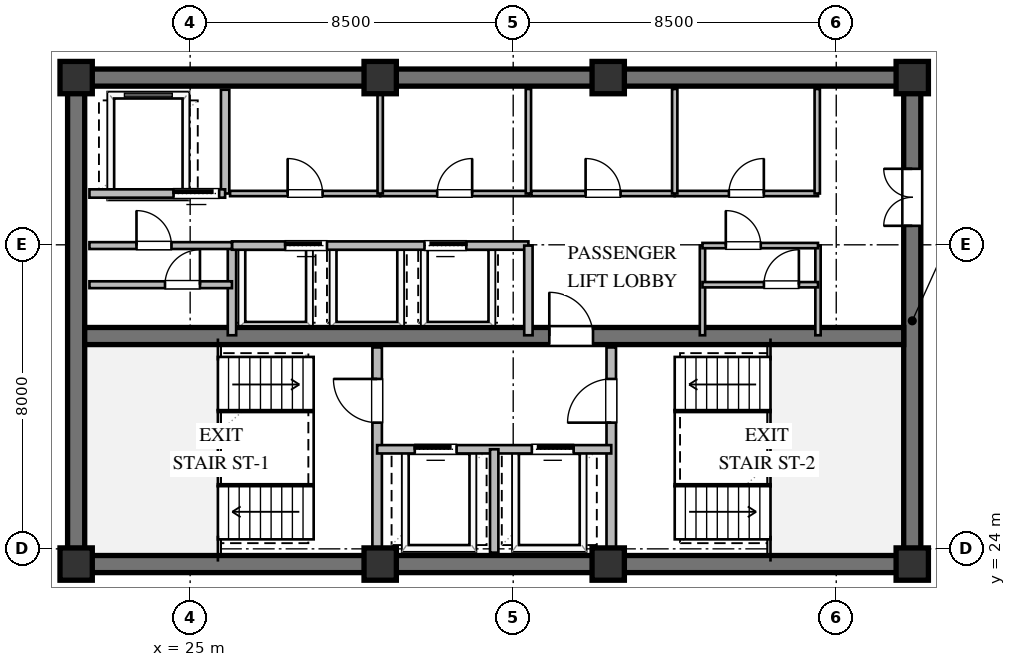
"""IFC4 building model, lengths in metres.
Left out: names, types, materials, properties, quantities, classifications, styles, units other than length and angle.
Written with IfcOpenShell. Run it as: python <this file> out.ifc"""

import sys

from ifc_helpers import new_model, si_unit, direction, frame, frame_2d, origin, origin_2d, place, context, subcontext, project, spatial, rectangle, extrude, element, fill, save


model = new_model("IFC4")
c1 = context("Model", 3, precision=1e-05, world=origin(), true_north=direction((0.0, 1.0)))
c2 = subcontext(c1, "Body", "Model", "MODEL_VIEW")
j1 = project(units=[si_unit("LENGTHUNIT", "METRE"), si_unit("PLANEANGLEUNIT", "RADIAN")], contexts=[c1])
p1 = place(None, origin())
s1 = spatial("IfcSite", under=j1, at=p1, CompositionType="ELEMENT")
p2 = place(p1, origin())
s2 = spatial("IfcBuilding", under=s1, at=p2, CompositionType="ELEMENT")
p3 = place(p2, frame((0.0, 0.0, 199.2)))
s3 = spatial("IfcBuildingStorey", under=s2, at=p3, CompositionType="ELEMENT", Elevation=199.2)
for number, where, z_axis, x_axis in (
    (1, (21.775, 23.6, 0.0), (0.0, 0.0, 1.0), (1.0, 0.0, 0.0)),
    (2, (21.775, 36.4, 0.0), (0.0, 0.0, 1.0), (1.0, 0.0, 0.0)),
):
    element("IfcWall", number, at=place(p3, frame(where, z_axis=z_axis, x_axis=x_axis)), inside=s3, PredefinedType="SHEAR", context=c2, shape_type="SweptSolid", body=[
        extrude(rectangle(XDim=22.45, YDim=0.45, at=frame_2d((11.225, 0.0))), origin(), (0.0, 0.0, 1.0), 3.36),
    ])
p4 = place(p3, frame((22.0, 23.825, 0.0), z_axis=(0.0, 0.0, 1.0), x_axis=(0.0, 1.0, 0.0)))
e3 = element("IfcWall", 3, at=p4, inside=s3, PredefinedType="SHEAR", context=c2, shape_type="SweptSolid", body=[
    extrude(rectangle(XDim=12.35, YDim=0.45, at=frame_2d((6.175, 0.0))), origin(), (0.0, 0.0, 1.0), 3.36),
])
p5 = place(p3, frame((44.0, 23.825, 0.0), z_axis=(0.0, 0.0, 1.0), x_axis=(0.0, 1.0, 0.0)))
e4 = element("IfcWall", 4, at=p5, inside=s3, PredefinedType="SHEAR", context=c2, shape_type="SweptSolid", body=[
    extrude(rectangle(XDim=12.35, YDim=0.45, at=frame_2d((6.175, 0.0))), origin(), (0.0, 0.0, 1.0), 3.36),
])
p6 = place(p5, frame((8.675, 0.0, 0.0)))
e5 = element("IfcOpeningElement", 5, at=p6, cuts=e4, PredefinedType="OPENING", context=c2, shape_type="SweptSolid", body=[
    extrude(rectangle(XDim=1.5, YDim=2.15, at=frame_2d((0.75, 1.075))), frame((0.0, 0.235, 0.0), z_axis=(0.0, -1.0, 0.0), x_axis=(1.0, 0.0, 0.0)), (0.0, 0.0, 1.0), 0.47),
])
p7 = place(p3, frame((22.225, 29.6, 0.0), z_axis=(0.0, 0.0, 1.0), x_axis=(1.0, 0.0, 0.0)))
e6 = element("IfcWall", 6, at=p7, inside=s3, PredefinedType="SHEAR", context=c2, shape_type="SweptSolid", body=[
    extrude(rectangle(XDim=21.55, YDim=0.45, at=frame_2d((10.775, 0.0))), origin(), (0.0, 0.0, 1.0), 3.36),
])
p8 = place(p7, frame((12.225, 0.0, 0.0)))
e7 = element("IfcOpeningElement", 7, at=p8, cuts=e6, PredefinedType="OPENING", context=c2, shape_type="SweptSolid", body=[
    extrude(rectangle(XDim=1.15, YDim=2.1, at=frame_2d((0.575, 1.05))), frame((0.0, 0.235, 0.0), z_axis=(0.0, -1.0, 0.0), x_axis=(1.0, 0.0, 0.0)), (0.0, 0.0, 1.0), 0.47),
])
for number, where, z_axis, x_axis in (
    (8, (22.0, 23.6, 0.0), (0.0, 0.0, 1.0), (1.0, 0.0, 0.0)),
    (9, (30.0, 23.6, 0.0), (0.0, 0.0, 1.0), (1.0, 0.0, 0.0)),
    (10, (36.0, 23.6, 0.0), (0.0, 0.0, 1.0), (1.0, 0.0, 0.0)),
    (11, (44.0, 23.6, 0.0), (0.0, 0.0, 1.0), (1.0, 0.0, 0.0)),
    (12, (44.0, 36.4, 0.0), (0.0, 0.0, 1.0), (1.0, 0.0, 0.0)),
    (13, (36.0, 36.4, 0.0), (0.0, 0.0, 1.0), (1.0, 0.0, 0.0)),
    (14, (30.0, 36.4, 0.0), (0.0, 0.0, 1.0), (1.0, 0.0, 0.0)),
    (15, (22.0, 36.4, 0.0), (0.0, 0.0, 1.0), (1.0, 0.0, 0.0)),
):
    element("IfcColumn", number, at=place(p3, frame(where, z_axis=z_axis, x_axis=x_axis)), inside=s3, PredefinedType="COLUMN", context=c2, shape_type="SweptSolid", body=[
        extrude(rectangle(XDim=0.85, YDim=0.85, at=origin_2d()), origin(), (0.0, 0.0, 1.0), 3.6),
    ])
p9 = place(p3, frame((29.92, 23.9, 0.0), z_axis=(0.0, 0.0, 1.0), x_axis=(0.0, 1.0, 0.0)))
e16 = element("IfcWall", 16, at=p9, inside=s3, PredefinedType="SOLIDWALL", context=c2, shape_type="SweptSolid", body=[
    extrude(rectangle(XDim=5.4, YDim=0.25, at=frame_2d((2.7, 0.0))), origin(), (0.0, 0.0, 1.0), 3.36),
])
p10 = place(p9, frame((3.421, 0.0, 0.0)))
e17 = element("IfcOpeningElement", 17, at=p10, cuts=e16, PredefinedType="OPENING", context=c2, shape_type="SweptSolid", body=[
    extrude(rectangle(XDim=1.15, YDim=2.1, at=frame_2d((0.575, 1.05))), frame((0.0, 0.135, 0.0), z_axis=(0.0, -1.0, 0.0), x_axis=(1.0, 0.0, 0.0)), (0.0, 0.0, 1.0), 0.27),
])
p11 = place(p3, frame((36.08, 23.9, 0.0), z_axis=(0.0, 0.0, 1.0), x_axis=(0.0, 1.0, 0.0)))
e18 = element("IfcWall", 18, at=p11, inside=s3, PredefinedType="SOLIDWALL", context=c2, shape_type="SweptSolid", body=[
    extrude(rectangle(XDim=5.4, YDim=0.25, at=frame_2d((2.7, 0.0))), origin(), (0.0, 0.0, 1.0), 3.36),
])
p12 = place(p11, frame((3.421, 0.0, 0.0)))
e19 = element("IfcOpeningElement", 19, at=p12, cuts=e18, PredefinedType="OPENING", context=c2, shape_type="SweptSolid", body=[
    extrude(rectangle(XDim=1.15, YDim=2.1, at=frame_2d((0.575, 1.05))), frame((0.0, 0.135, 0.0), z_axis=(0.0, -1.0, 0.0), x_axis=(1.0, 0.0, 0.0)), (0.0, 0.0, 1.0), 0.27),
])
p13 = place(p3, frame((29.92, 26.62, 0.0), z_axis=(0.0, 0.0, 1.0), x_axis=(1.0, 0.0, 0.0)))
e20 = element("IfcWall", 20, at=p13, inside=s3, PredefinedType="SOLIDWALL", context=c2, shape_type="SweptSolid", body=[
    extrude(rectangle(XDim=6.16, YDim=0.22, at=frame_2d((3.08, 0.0))), origin(), (0.0, 0.0, 1.0), 3.36),
])
p14 = place(p13, frame((0.99, 0.0, 0.0)))
e21 = element("IfcOpeningElement", 21, at=p14, cuts=e20, PredefinedType="OPENING", context=c2, shape_type="SweptSolid", body=[
    extrude(rectangle(XDim=1.1, YDim=2.1, at=frame_2d((0.55, 1.05))), frame((0.0, 0.12, 0.0), z_axis=(0.0, -1.0, 0.0), x_axis=(1.0, 0.0, 0.0)), (0.0, 0.0, 1.0), 0.24),
])
p15 = place(p13, frame((4.07, 0.0, 0.0)))
e22 = element("IfcOpeningElement", 22, at=p15, cuts=e20, PredefinedType="OPENING", context=c2, shape_type="SweptSolid", body=[
    extrude(rectangle(XDim=1.1, YDim=2.1, at=frame_2d((0.55, 1.05))), frame((0.0, 0.12, 0.0), z_axis=(0.0, -1.0, 0.0), x_axis=(1.0, 0.0, 0.0)), (0.0, 0.0, 1.0), 0.24),
])
p16 = place(p3, frame((33.0, 23.9, 0.0), z_axis=(0.0, 0.0, 1.0), x_axis=(0.0, 1.0, 0.0)))
e23 = element("IfcWall", 23, at=p16, inside=s3, PredefinedType="SOLIDWALL", context=c2, shape_type="SweptSolid", body=[
    extrude(rectangle(XDim=2.72, YDim=0.22, at=frame_2d((1.36, 0.0))), origin(), (0.0, 0.0, 1.0), 3.36),
])
p17 = place(p3, frame((25.92, 33.35, 0.0), z_axis=(0.0, 0.0, 1.0), x_axis=(0.0, 1.0, 0.0)))
e24 = element("IfcWall", 24, at=p17, inside=s3, PredefinedType="SOLIDWALL", context=c2, shape_type="SweptSolid", body=[
    extrude(rectangle(XDim=2.73, YDim=0.22, at=frame_2d((1.365, 0.0))), origin(), (0.0, 0.0, 1.0), 3.36),
])
p18 = place(p3, frame((22.35, 33.35, 0.0), z_axis=(0.0, 0.0, 1.0), x_axis=(1.0, 0.0, 0.0)))
e25 = element("IfcWall", 25, at=p18, inside=s3, PredefinedType="SOLIDWALL", context=c2, shape_type="SweptSolid", body=[
    extrude(rectangle(XDim=3.57, YDim=0.22, at=frame_2d((1.785, 0.0))), origin(), (0.0, 0.0, 1.0), 3.36),
])
p19 = place(p18, frame((2.213, 0.0, 0.0)))
e26 = element("IfcOpeningElement", 26, at=p19, cuts=e25, PredefinedType="OPENING", context=c2, shape_type="SweptSolid", body=[
    extrude(rectangle(XDim=1.2, YDim=2.1, at=frame_2d((0.6, 1.05))), frame((0.0, 0.12, 0.0), z_axis=(0.0, -1.0, 0.0), x_axis=(1.0, 0.0, 0.0)), (0.0, 0.0, 1.0), 0.24),
])
p20 = place(p3, frame((26.1, 29.62, 0.0), z_axis=(0.0, 0.0, 1.0), x_axis=(0.0, 1.0, 0.0)))
e27 = element("IfcWall", 27, at=p20, inside=s3, PredefinedType="SOLIDWALL", context=c2, shape_type="SweptSolid", body=[
    extrude(rectangle(XDim=2.36, YDim=0.22, at=frame_2d((1.18, 0.0))), origin(), (0.0, 0.0, 1.0), 3.36),
])
p21 = place(p3, frame((26.1, 31.98, 0.0), z_axis=(0.0, 0.0, 1.0), x_axis=(1.0, 0.0, 0.0)))
e28 = element("IfcWall", 28, at=p21, inside=s3, PredefinedType="SOLIDWALL", context=c2, shape_type="SweptSolid", body=[
    extrude(rectangle(XDim=7.8, YDim=0.22, at=frame_2d((3.9, 0.0))), origin(), (0.0, 0.0, 1.0), 3.36),
])
p22 = place(p21, frame((1.4, 0.0, 0.0)))
e29 = element("IfcOpeningElement", 29, at=p22, cuts=e28, PredefinedType="OPENING", context=c2, shape_type="SweptSolid", body=[
    extrude(rectangle(XDim=1.1, YDim=2.1, at=frame_2d((0.55, 1.05))), frame((0.0, 0.12, 0.0), z_axis=(0.0, -1.0, 0.0), x_axis=(1.0, 0.0, 0.0)), (0.0, 0.0, 1.0), 0.24),
])
p23 = place(p21, frame((5.066, 0.0, 0.0)))
e30 = element("IfcOpeningElement", 30, at=p23, cuts=e28, PredefinedType="OPENING", context=c2, shape_type="SweptSolid", body=[
    extrude(rectangle(XDim=1.1, YDim=2.1, at=frame_2d((0.55, 1.05))), frame((0.0, 0.12, 0.0), z_axis=(0.0, -1.0, 0.0), x_axis=(1.0, 0.0, 0.0)), (0.0, 0.0, 1.0), 0.24),
])
p24 = place(p3, frame((33.9, 29.62, 0.0), z_axis=(0.0, 0.0, 1.0), x_axis=(0.0, 1.0, 0.0)))
e31 = element("IfcWall", 31, at=p24, inside=s3, PredefinedType="SOLIDWALL", context=c2, shape_type="SweptSolid", body=[
    extrude(rectangle(XDim=2.36, YDim=0.22, at=frame_2d((1.18, 0.0))), origin(), (0.0, 0.0, 1.0), 3.36),
])
p25 = place(p3, frame((26.05, 33.35, 0.0), z_axis=(0.0, 0.0, 1.0), x_axis=(1.0, 0.0, 0.0)))
e32 = element("IfcWall", 32, at=p25, inside=s3, PredefinedType="PARTITIONING", context=c2, shape_type="SweptSolid", body=[
    extrude(rectangle(XDim=3.95, YDim=0.14, at=frame_2d((1.975, 0.0))), origin(), (0.0, 0.0, 1.0), 3.36),
])
p26 = place(p25, frame((1.515, 0.0, 0.0)))
e33 = element("IfcOpeningElement", 33, at=p26, cuts=e32, PredefinedType="OPENING", context=c2, shape_type="SweptSolid", body=[
    extrude(rectangle(XDim=0.92, YDim=2.1, at=frame_2d((0.46, 1.05))), frame((0.0, 0.08, 0.0), z_axis=(0.0, -1.0, 0.0), x_axis=(1.0, 0.0, 0.0)), (0.0, 0.0, 1.0), 0.16),
])
p27 = place(p3, frame((30.0, 33.35, 0.0), z_axis=(0.0, 0.0, 1.0), x_axis=(1.0, 0.0, 0.0)))
e34 = element("IfcWall", 34, at=p27, inside=s3, PredefinedType="PARTITIONING", context=c2, shape_type="SweptSolid", body=[
    extrude(rectangle(XDim=3.92, YDim=0.14, at=frame_2d((1.96, 0.0))), origin(), (0.0, 0.0, 1.0), 3.36),
])
p28 = place(p27, frame((1.5, 0.0, 0.0)))
e35 = element("IfcOpeningElement", 35, at=p28, cuts=e34, PredefinedType="OPENING", context=c2, shape_type="SweptSolid", body=[
    extrude(rectangle(XDim=0.92, YDim=2.1, at=frame_2d((0.46, 1.05))), frame((0.0, 0.08, 0.0), z_axis=(0.0, -1.0, 0.0), x_axis=(1.0, 0.0, 0.0)), (0.0, 0.0, 1.0), 0.16),
])
for number, where, z_axis, x_axis in (
    (36, (30.0, 33.35, 0.0), (0.0, 0.0, 1.0), (0.0, 1.0, 0.0)),
    (37, (33.9, 33.35, 0.0), (0.0, 0.0, 1.0), (0.0, 1.0, 0.0)),
):
    element("IfcWall", number, at=place(p3, frame(where, z_axis=z_axis, x_axis=x_axis)), inside=s3, PredefinedType="PARTITIONING", context=c2, shape_type="SweptSolid", body=[
        extrude(rectangle(XDim=2.75, YDim=0.14, at=frame_2d((1.375, 0.0))), origin(), (0.0, 0.0, 1.0), 3.36),
    ])
p29 = place(p3, frame((33.98, 33.35, 0.0), z_axis=(0.0, 0.0, 1.0), x_axis=(1.0, 0.0, 0.0)))
e38 = element("IfcWall", 38, at=p29, inside=s3, PredefinedType="PARTITIONING", context=c2, shape_type="SweptSolid", body=[
    extrude(rectangle(XDim=3.77, YDim=0.14, at=frame_2d((1.885, 0.0))), origin(), (0.0, 0.0, 1.0), 3.36),
])
p30 = place(p29, frame((1.425, 0.0, 0.0)))
e39 = element("IfcOpeningElement", 39, at=p30, cuts=e38, PredefinedType="OPENING", context=c2, shape_type="SweptSolid", body=[
    extrude(rectangle(XDim=0.92, YDim=2.1, at=frame_2d((0.46, 1.05))), frame((0.0, 0.08, 0.0), z_axis=(0.0, -1.0, 0.0), x_axis=(1.0, 0.0, 0.0)), (0.0, 0.0, 1.0), 0.16),
])
p31 = place(p3, frame((37.75, 33.35, 0.0), z_axis=(0.0, 0.0, 1.0), x_axis=(1.0, 0.0, 0.0)))
e40 = element("IfcWall", 40, at=p31, inside=s3, PredefinedType="PARTITIONING", context=c2, shape_type="SweptSolid", body=[
    extrude(rectangle(XDim=3.77, YDim=0.14, at=frame_2d((1.885, 0.0))), origin(), (0.0, 0.0, 1.0), 3.36),
])
p32 = place(p31, frame((1.425, 0.0, 0.0)))
e41 = element("IfcOpeningElement", 41, at=p32, cuts=e40, PredefinedType="OPENING", context=c2, shape_type="SweptSolid", body=[
    extrude(rectangle(XDim=0.92, YDim=2.1, at=frame_2d((0.46, 1.05))), frame((0.0, 0.08, 0.0), z_axis=(0.0, -1.0, 0.0), x_axis=(1.0, 0.0, 0.0)), (0.0, 0.0, 1.0), 0.16),
])
for number, where, z_axis, x_axis in (
    (42, (37.75, 33.35, 0.0), (0.0, 0.0, 1.0), (0.0, 1.0, 0.0)),
    (43, (41.5, 33.35, 0.0), (0.0, 0.0, 1.0), (0.0, 1.0, 0.0)),
):
    element("IfcWall", number, at=place(p3, frame(where, z_axis=z_axis, x_axis=x_axis)), inside=s3, PredefinedType="PARTITIONING", context=c2, shape_type="SweptSolid", body=[
        extrude(rectangle(XDim=2.75, YDim=0.14, at=frame_2d((1.375, 0.0))), origin(), (0.0, 0.0, 1.0), 3.36),
    ])
p33 = place(p3, frame((22.35, 30.95, 0.0), z_axis=(0.0, 0.0, 1.0), x_axis=(1.0, 0.0, 0.0)))
e44 = element("IfcWall", 44, at=p33, inside=s3, PredefinedType="PARTITIONING", context=c2, shape_type="SweptSolid", body=[
    extrude(rectangle(XDim=3.75, YDim=0.18, at=frame_2d((1.875, 0.0))), origin(), (0.0, 0.0, 1.0), 3.36),
])
p34 = place(p33, frame((1.988, 0.0, 0.0)))
e45 = element("IfcOpeningElement", 45, at=p34, cuts=e44, PredefinedType="OPENING", context=c2, shape_type="SweptSolid", body=[
    extrude(rectangle(XDim=0.92, YDim=2.1, at=frame_2d((0.46, 1.05))), frame((0.0, 0.1, 0.0), z_axis=(0.0, -1.0, 0.0), x_axis=(1.0, 0.0, 0.0)), (0.0, 0.0, 1.0), 0.2),
])
p35 = place(p3, frame((22.35, 31.98, 0.0), z_axis=(0.0, 0.0, 1.0), x_axis=(1.0, 0.0, 0.0)))
e46 = element("IfcWall", 46, at=p35, inside=s3, PredefinedType="PARTITIONING", context=c2, shape_type="SweptSolid", body=[
    extrude(rectangle(XDim=3.75, YDim=0.18, at=frame_2d((1.875, 0.0))), origin(), (0.0, 0.0, 1.0), 3.36),
])
p36 = place(p35, frame((1.238, 0.0, 0.0)))
e47 = element("IfcOpeningElement", 47, at=p36, cuts=e46, PredefinedType="OPENING", context=c2, shape_type="SweptSolid", body=[
    extrude(rectangle(XDim=0.92, YDim=2.1, at=frame_2d((0.46, 1.05))), frame((0.0, 0.1, 0.0), z_axis=(0.0, -1.0, 0.0), x_axis=(1.0, 0.0, 0.0)), (0.0, 0.0, 1.0), 0.2),
])
for number, where, z_axis, x_axis in (
    (48, (38.48, 29.62, 0.0), (0.0, 0.0, 1.0), (0.0, 1.0, 0.0)),
    (49, (41.52, 29.62, 0.0), (0.0, 0.0, 1.0), (0.0, 1.0, 0.0)),
):
    element("IfcWall", number, at=place(p3, frame(where, z_axis=z_axis, x_axis=x_axis)), inside=s3, PredefinedType="PARTITIONING", context=c2, shape_type="SweptSolid", body=[
        extrude(rectangle(XDim=2.36, YDim=0.14, at=frame_2d((1.18, 0.0))), origin(), (0.0, 0.0, 1.0), 3.36),
    ])
p37 = place(p3, frame((38.48, 30.95, 0.0), z_axis=(0.0, 0.0, 1.0), x_axis=(1.0, 0.0, 0.0)))
e50 = element("IfcWall", 50, at=p37, inside=s3, PredefinedType="PARTITIONING", context=c2, shape_type="SweptSolid", body=[
    extrude(rectangle(XDim=3.04, YDim=0.14, at=frame_2d((1.52, 0.0))), origin(), (0.0, 0.0, 1.0), 3.36),
])
p38 = place(p37, frame((1.617, 0.0, 0.0)))
e51 = element("IfcOpeningElement", 51, at=p38, cuts=e50, PredefinedType="OPENING", context=c2, shape_type="SweptSolid", body=[
    extrude(rectangle(XDim=0.92, YDim=2.1, at=frame_2d((0.46, 1.05))), frame((0.0, 0.08, 0.0), z_axis=(0.0, -1.0, 0.0), x_axis=(1.0, 0.0, 0.0)), (0.0, 0.0, 1.0), 0.16),
])
p39 = place(p3, frame((38.48, 31.98, 0.0), z_axis=(0.0, 0.0, 1.0), x_axis=(1.0, 0.0, 0.0)))
e52 = element("IfcWall", 52, at=p39, inside=s3, PredefinedType="PARTITIONING", context=c2, shape_type="SweptSolid", body=[
    extrude(rectangle(XDim=3.04, YDim=0.14, at=frame_2d((1.52, 0.0))), origin(), (0.0, 0.0, 1.0), 3.36),
])
p40 = place(p39, frame((0.614, 0.0, 0.0)))
e53 = element("IfcOpeningElement", 53, at=p40, cuts=e52, PredefinedType="OPENING", context=c2, shape_type="SweptSolid", body=[
    extrude(rectangle(XDim=0.92, YDim=2.1, at=frame_2d((0.46, 1.05))), frame((0.0, 0.08, 0.0), z_axis=(0.0, -1.0, 0.0), x_axis=(1.0, 0.0, 0.0)), (0.0, 0.0, 1.0), 0.16),
])
p41 = place(p10, origin())
e54 = element("IfcDoor", 54, at=p41, inside=s3, OperationType="SINGLE_SWING_RIGHT", PredefinedType="DOOR", context=c2, shape_type="SweptSolid", body=[
    extrude(rectangle(XDim=1.15, YDim=2.1, at=frame_2d((0.575, 1.05))), frame((0.0, 0.025, 0.0), z_axis=(0.0, -1.0, 0.0), x_axis=(1.0, 0.0, 0.0)), (0.0, 0.0, 1.0), 0.05),
])
fill(e17, e54)
p42 = place(p12, origin())
e55 = element("IfcDoor", 55, at=p42, inside=s3, OperationType="SINGLE_SWING_LEFT", PredefinedType="DOOR", context=c2, shape_type="SweptSolid", body=[
    extrude(rectangle(XDim=1.15, YDim=2.1, at=frame_2d((0.575, 1.05))), frame((0.0, 0.025, 0.0), z_axis=(0.0, -1.0, 0.0), x_axis=(1.0, 0.0, 0.0)), (0.0, 0.0, 1.0), 0.05),
])
fill(e19, e55)
p43 = place(p14, origin())
e56 = element("IfcDoor", 56, at=p43, inside=s3, OperationType="SLIDING_TO_LEFT", PredefinedType="DOOR", context=c2, shape_type="SweptSolid", body=[
    extrude(rectangle(XDim=1.1, YDim=2.1, at=frame_2d((0.55, 1.05))), frame((0.0, 0.025, 0.0), z_axis=(0.0, -1.0, 0.0), x_axis=(1.0, 0.0, 0.0)), (0.0, 0.0, 1.0), 0.05),
])
fill(e21, e56)
p44 = place(p15, origin())
e57 = element("IfcDoor", 57, at=p44, inside=s3, OperationType="SLIDING_TO_RIGHT", PredefinedType="DOOR", context=c2, shape_type="SweptSolid", body=[
    extrude(rectangle(XDim=1.1, YDim=2.1, at=frame_2d((0.55, 1.05))), frame((0.0, 0.025, 0.0), z_axis=(0.0, -1.0, 0.0), x_axis=(1.0, 0.0, 0.0)), (0.0, 0.0, 1.0), 0.05),
])
fill(e22, e57)
p45 = place(p8, origin())
e58 = element("IfcDoor", 58, at=p45, inside=s3, OperationType="SINGLE_SWING_LEFT", PredefinedType="DOOR", context=c2, shape_type="SweptSolid", body=[
    extrude(rectangle(XDim=1.15, YDim=2.1, at=frame_2d((0.575, 1.05))), frame((0.0, 0.025, 0.0), z_axis=(0.0, -1.0, 0.0), x_axis=(1.0, 0.0, 0.0)), (0.0, 0.0, 1.0), 0.05),
])
fill(e7, e58)
p46 = place(p6, origin())
e59 = element("IfcDoor", 59, at=p46, inside=s3, OperationType="DOUBLE_DOOR_SINGLE_SWING", PredefinedType="DOOR", context=c2, shape_type="SweptSolid", body=[
    extrude(rectangle(XDim=1.5, YDim=2.15, at=frame_2d((0.75, 1.075))), frame((0.0, 0.025, 0.0), z_axis=(0.0, -1.0, 0.0), x_axis=(1.0, 0.0, 0.0)), (0.0, 0.0, 1.0), 0.05),
])
fill(e5, e59)
p47 = place(p19, origin())
e60 = element("IfcDoor", 60, at=p47, inside=s3, OperationType="SLIDING_TO_LEFT", PredefinedType="DOOR", context=c2, shape_type="SweptSolid", body=[
    extrude(rectangle(XDim=1.2, YDim=2.1, at=frame_2d((0.6, 1.05))), frame((0.0, 0.025, 0.0), z_axis=(0.0, -1.0, 0.0), x_axis=(1.0, 0.0, 0.0)), (0.0, 0.0, 1.0), 0.05),
])
fill(e26, e60)
p48 = place(p22, origin())
e61 = element("IfcDoor", 61, at=p48, inside=s3, OperationType="SLIDING_TO_LEFT", PredefinedType="DOOR", context=c2, shape_type="SweptSolid", body=[
    extrude(rectangle(XDim=1.1, YDim=2.1, at=frame_2d((0.55, 1.05))), frame((0.0, 0.025, 0.0), z_axis=(0.0, -1.0, 0.0), x_axis=(1.0, 0.0, 0.0)), (0.0, 0.0, 1.0), 0.05),
])
fill(e29, e61)
p49 = place(p23, origin())
e62 = element("IfcDoor", 62, at=p49, inside=s3, OperationType="SLIDING_TO_RIGHT", PredefinedType="DOOR", context=c2, shape_type="SweptSolid", body=[
    extrude(rectangle(XDim=1.1, YDim=2.1, at=frame_2d((0.55, 1.05))), frame((0.0, 0.025, 0.0), z_axis=(0.0, -1.0, 0.0), x_axis=(1.0, 0.0, 0.0)), (0.0, 0.0, 1.0), 0.05),
])
fill(e30, e62)
p50 = place(p26, origin())
e63 = element("IfcDoor", 63, at=p50, inside=s3, OperationType="SINGLE_SWING_LEFT", PredefinedType="DOOR", context=c2, shape_type="SweptSolid", body=[
    extrude(rectangle(XDim=0.92, YDim=2.1, at=frame_2d((0.46, 1.05))), frame((0.0, 0.025, 0.0), z_axis=(0.0, -1.0, 0.0), x_axis=(1.0, 0.0, 0.0)), (0.0, 0.0, 1.0), 0.05),
])
fill(e33, e63)
p51 = place(p28, origin())
e64 = element("IfcDoor", 64, at=p51, inside=s3, OperationType="SINGLE_SWING_RIGHT", PredefinedType="DOOR", context=c2, shape_type="SweptSolid", body=[
    extrude(rectangle(XDim=0.92, YDim=2.1, at=frame_2d((0.46, 1.05))), frame((0.0, 0.025, 0.0), z_axis=(0.0, -1.0, 0.0), x_axis=(1.0, 0.0, 0.0)), (0.0, 0.0, 1.0), 0.05),
])
fill(e35, e64)
p52 = place(p30, origin())
e65 = element("IfcDoor", 65, at=p52, inside=s3, OperationType="SINGLE_SWING_LEFT", PredefinedType="DOOR", context=c2, shape_type="SweptSolid", body=[
    extrude(rectangle(XDim=0.92, YDim=2.1, at=frame_2d((0.46, 1.05))), frame((0.0, 0.025, 0.0), z_axis=(0.0, -1.0, 0.0), x_axis=(1.0, 0.0, 0.0)), (0.0, 0.0, 1.0), 0.05),
])
fill(e39, e65)
p53 = place(p32, origin())
e66 = element("IfcDoor", 66, at=p53, inside=s3, OperationType="SINGLE_SWING_RIGHT", PredefinedType="DOOR", context=c2, shape_type="SweptSolid", body=[
    extrude(rectangle(XDim=0.92, YDim=2.1, at=frame_2d((0.46, 1.05))), frame((0.0, 0.025, 0.0), z_axis=(0.0, -1.0, 0.0), x_axis=(1.0, 0.0, 0.0)), (0.0, 0.0, 1.0), 0.05),
])
fill(e41, e66)
p54 = place(p36, origin())
e67 = element("IfcDoor", 67, at=p54, inside=s3, OperationType="SINGLE_SWING_LEFT", PredefinedType="DOOR", context=c2, shape_type="SweptSolid", body=[
    extrude(rectangle(XDim=0.92, YDim=2.1, at=frame_2d((0.46, 1.05))), frame((0.0, 0.025, 0.0), z_axis=(0.0, -1.0, 0.0), x_axis=(1.0, 0.0, 0.0)), (0.0, 0.0, 1.0), 0.05),
])
fill(e47, e67)
p55 = place(p34, origin())
e68 = element("IfcDoor", 68, at=p55, inside=s3, OperationType="SINGLE_SWING_RIGHT", PredefinedType="DOOR", context=c2, shape_type="SweptSolid", body=[
    extrude(rectangle(XDim=0.92, YDim=2.1, at=frame_2d((0.46, 1.05))), frame((0.0, 0.025, 0.0), z_axis=(0.0, -1.0, 0.0), x_axis=(1.0, 0.0, 0.0)), (0.0, 0.0, 1.0), 0.05),
])
fill(e45, e68)
p56 = place(p40, origin())
e69 = element("IfcDoor", 69, at=p56, inside=s3, OperationType="SINGLE_SWING_LEFT", PredefinedType="DOOR", context=c2, shape_type="SweptSolid", body=[
    extrude(rectangle(XDim=0.92, YDim=2.1, at=frame_2d((0.46, 1.05))), frame((0.0, 0.025, 0.0), z_axis=(0.0, -1.0, 0.0), x_axis=(1.0, 0.0, 0.0)), (0.0, 0.0, 1.0), 0.05),
])
fill(e53, e69)
p57 = place(p38, origin())
e70 = element("IfcDoor", 70, at=p57, inside=s3, OperationType="SINGLE_SWING_RIGHT", PredefinedType="DOOR", context=c2, shape_type="SweptSolid", body=[
    extrude(rectangle(XDim=0.92, YDim=2.1, at=frame_2d((0.46, 1.05))), frame((0.0, 0.025, 0.0), z_axis=(0.0, -1.0, 0.0), x_axis=(1.0, 0.0, 0.0)), (0.0, 0.0, 1.0), 0.05),
])
fill(e51, e70)
save(model, sys.argv[1])
